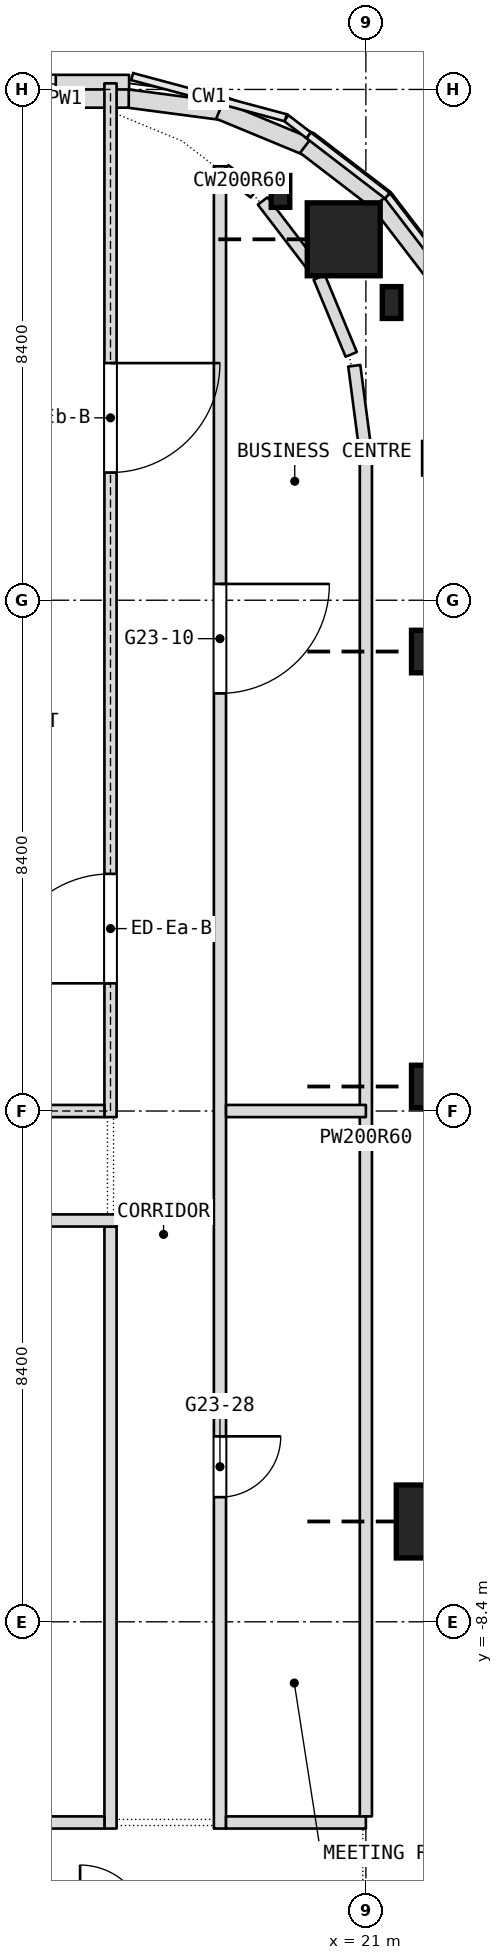
"""IFC4 building model, lengths in metres.
Left out: names, types, materials, properties, quantities, classifications, styles, units other than length and angle.
Written with IfcOpenShell. Run it as: python <this file> out.ifc"""

import sys

from ifc_helpers import new_model, si_unit, direction, frame, frame_2d, origin, origin_2d, place, context, subcontext, project, spatial, rectangle, i_section, extrude, element, fill, save


model = new_model("IFC4")
c1 = context("Model", 3, precision=1e-05, world=origin(), true_north=direction((0.0, 1.0)))
c2 = subcontext(c1, "Body", "Model", "MODEL_VIEW")
j1 = project(units=[si_unit("LENGTHUNIT", "METRE"), si_unit("PLANEANGLEUNIT", "RADIAN")], contexts=[c1])
p1 = place(None, origin())
s1 = spatial("IfcSite", under=j1, at=p1, CompositionType="ELEMENT")
p2 = place(p1, origin())
s2 = spatial("IfcBuilding", under=s1, at=p2, CompositionType="ELEMENT")
p3 = place(p2, frame((0.0, 0.0, 277.7)))
s3 = spatial("IfcBuildingStorey", under=s2, at=p3, CompositionType="ELEMENT", Elevation=277.7)
p4 = place(p3, frame((19.596, 15.123, -0.26), z_axis=(0.0, 0.0, 1.0), x_axis=(1.0, 0.0, 0.0)))
e1 = element("IfcColumn", 1, at=p4, inside=s3, PredefinedType="COLUMN", context=c2, shape_type="SweptSolid", body=[
    extrude(i_section(OverallWidth=0.306, OverallDepth=0.524, WebThickness=0.024, FlangeThickness=0.04, FilletRadius=0.027, at=origin_2d()), origin(), (0.0, 0.0, 1.0), 3.2),
])
p5 = place(p3, frame((20.635, 14.335, 0.0), z_axis=(0.0, 0.0, 1.0), x_axis=(1.0, 0.0, 0.0)))
e2 = element("IfcColumn", 2, at=p5, inside=s3, PredefinedType="COLUMN", context=c2, shape_type="SweptSolid", body=[
    extrude(i_section(OverallWidth=0.306, OverallDepth=0.524, WebThickness=0.024, FlangeThickness=0.04, FilletRadius=0.027, at=origin_2d()), origin(), (0.0, 0.0, 1.0), 2.94),
])
for number, where, z_axis, x_axis in (
    (3, (21.423, 13.296, -0.26), (0.0, 0.0, 1.0), (1.0, 0.0, 0.0)),
    (4, (22.1, 10.734, -0.26), (0.0, 0.0, 1.0), (1.0, 0.0, 0.0)),
):
    element("IfcColumn", number, at=place(p3, frame(where, z_axis=z_axis, x_axis=x_axis)), inside=s3, PredefinedType="COLUMN", context=c2, shape_type="SweptSolid", body=[
        extrude(i_section(OverallWidth=0.306, OverallDepth=0.524, WebThickness=0.024, FlangeThickness=0.04, FilletRadius=0.027, at=origin_2d()), origin(), (0.0, 0.0, 1.0), 3.2),
    ])
for number, where, z_axis, x_axis in (
    (5, (22.1, 7.556, 0.0), (0.0, 0.0, 1.0), (1.0, 0.0, 0.0)),
    (6, (22.1, 0.403, 0.0), (0.0, 0.0, 1.0), (1.0, 0.0, 0.0)),
    (7, (22.1, -6.75, 0.0), (0.0, 0.0, 1.0), (1.0, 0.0, 0.0)),
):
    element("IfcColumn", number, at=place(p3, frame(where, z_axis=z_axis, x_axis=x_axis)), inside=s3, PredefinedType="COLUMN", context=c2, shape_type="SweptSolid", body=[
        extrude(i_section(OverallWidth=0.306, OverallDepth=0.524, WebThickness=0.024, FlangeThickness=0.04, FilletRadius=0.027, at=origin_2d()), origin(), (0.0, 0.0, 1.0), 2.94),
    ])
p6 = place(p3, frame((21.0, -11.6, 0.0), z_axis=(0.0, 0.0, 1.0), x_axis=(0.0, 1.0, 0.0)))
e8 = element("IfcWall", 8, at=p6, inside=s3, PredefinedType="PARTITIONING", context=c2, shape_type="SweptSolid", body=[
    extrude(rectangle(XDim=22.302, YDim=0.2, at=frame_2d((11.151, 0.0))), origin(), (0.0, 0.0, 1.0), 3.34),
])
p7 = place(p3, frame((18.6, -11.8, 0.0), z_axis=(0.0, 0.0, 1.0), x_axis=(0.0, 1.0, 0.0)))
e9 = element("IfcWall", 9, at=p7, inside=s3, PredefinedType="PARTITIONING", context=c2, shape_type="SweptSolid", body=[
    extrude(rectangle(XDim=27.336, YDim=0.2, at=frame_2d((13.668, 0.0))), origin(), (0.0, 0.0, 1.0), 3.34),
])
p8 = place(p7, frame((18.668, 0.0, 0.0)))
e10 = element("IfcOpeningElement", 10, at=p8, cuts=e9, PredefinedType="OPENING", context=c2, shape_type="SweptSolid", body=[
    extrude(rectangle(XDim=1.8, YDim=2.1, at=frame_2d((0.9, 1.05))), frame((0.0, 0.1, 0.0), z_axis=(0.0, -1.0, 0.0), x_axis=(1.0, 0.0, 0.0)), (0.0, 0.0, 1.0), 0.2),
])
p9 = place(p7, frame((5.45, 0.0, 0.0)))
e11 = element("IfcOpeningElement", 11, at=p9, cuts=e9, PredefinedType="OPENING", context=c2, shape_type="SweptSolid", body=[
    extrude(rectangle(XDim=1.0, YDim=2.1, at=frame_2d((0.5, 1.05))), frame((0.0, 0.1, 0.0), z_axis=(0.0, -1.0, 0.0), x_axis=(1.0, 0.0, 0.0)), (0.0, 0.0, 1.0), 0.2),
])
p10 = place(p3, frame((16.8, -11.8, 0.0), z_axis=(0.0, 0.0, 1.0), x_axis=(0.0, 1.0, 0.0)))
e12 = element("IfcWall", 12, at=p10, inside=s3, PredefinedType="PARTITIONING", context=c2, shape_type="SweptSolid", body=[
    extrude(rectangle(XDim=9.9, YDim=0.2, at=frame_2d((4.95, 0.0))), origin(), (0.0, 0.0, 1.0), 3.34),
])
p11 = place(p3, frame((-8.3, -11.7, 0.0), z_axis=(0.0, 0.0, 1.0), x_axis=(1.0, 0.0, 0.0)))
e13 = element("IfcWall", 13, at=p11, inside=s3, PredefinedType="PARTITIONING", context=c2, shape_type="SweptSolid", body=[
    extrude(rectangle(XDim=25.0, YDim=0.2, at=frame_2d((12.5, 0.0))), origin(), (0.0, 0.0, 1.0), 3.34),
])
p12 = place(p3, frame((18.7, -11.7, 0.0), z_axis=(0.0, 0.0, 1.0), x_axis=(1.0, 0.0, 0.0)))
e14 = element("IfcWall", 14, at=p12, inside=s3, PredefinedType="PARTITIONING", context=c2, shape_type="SweptSolid", body=[
    extrude(rectangle(XDim=2.3, YDim=0.2, at=frame_2d((1.15, 0.0))), origin(), (0.0, 0.0, 1.0), 3.34),
])
p13 = place(p3, frame((-16.9, -1.8, 0.0), z_axis=(0.0, 0.0, 1.0), x_axis=(1.0, 0.0, 0.0)))
e15 = element("IfcWall", 15, at=p13, inside=s3, PredefinedType="PARTITIONING", context=c2, shape_type="SweptSolid", body=[
    extrude(rectangle(XDim=33.8, YDim=0.2, at=frame_2d((16.9, 0.0))), origin(), (0.0, 0.0, 1.0), 3.34),
])
p14 = place(p13, frame((1.7, 0.0, 0.0)))
e16 = element("IfcOpeningElement", 16, at=p14, cuts=e15, PredefinedType="OPENING", context=c2, shape_type="SweptSolid", body=[
    extrude(rectangle(XDim=1.0, YDim=2.1, at=frame_2d((0.5, 1.05))), frame((0.0, 0.1, 0.0), z_axis=(0.0, -1.0, 0.0), x_axis=(1.0, 0.0, 0.0)), (0.0, 0.0, 1.0), 0.2),
])
p15 = place(p13, frame((5.9, 0.0, 0.0)))
e17 = element("IfcOpeningElement", 17, at=p15, cuts=e15, PredefinedType="OPENING", context=c2, shape_type="SweptSolid", body=[
    extrude(rectangle(XDim=1.0, YDim=2.1, at=frame_2d((0.5, 1.05))), frame((0.0, 0.1, 0.0), z_axis=(0.0, -1.0, 0.0), x_axis=(1.0, 0.0, 0.0)), (0.0, 0.0, 1.0), 0.2),
])
p16 = place(p13, frame((10.1, 0.0, 0.0)))
e18 = element("IfcOpeningElement", 18, at=p16, cuts=e15, PredefinedType="OPENING", context=c2, shape_type="SweptSolid", body=[
    extrude(rectangle(XDim=1.0, YDim=2.1, at=frame_2d((0.5, 1.05))), frame((0.0, 0.1, 0.0), z_axis=(0.0, -1.0, 0.0), x_axis=(1.0, 0.0, 0.0)), (0.0, 0.0, 1.0), 0.2),
])
p17 = place(p13, frame((16.0, 0.0, 0.0)))
e19 = element("IfcOpeningElement", 19, at=p17, cuts=e15, PredefinedType="OPENING", context=c2, shape_type="SweptSolid", body=[
    extrude(rectangle(XDim=1.8, YDim=2.1, at=frame_2d((0.9, 1.05))), frame((0.0, 0.1, 0.0), z_axis=(0.0, -1.0, 0.0), x_axis=(1.0, 0.0, 0.0)), (0.0, 0.0, 1.0), 0.2),
])
p18 = place(p13, frame((22.7, 0.0, 0.0)))
e20 = element("IfcOpeningElement", 20, at=p18, cuts=e15, PredefinedType="OPENING", context=c2, shape_type="SweptSolid", body=[
    extrude(rectangle(XDim=1.0, YDim=2.1, at=frame_2d((0.5, 1.05))), frame((0.0, 0.1, 0.0), z_axis=(0.0, -1.0, 0.0), x_axis=(1.0, 0.0, 0.0)), (0.0, 0.0, 1.0), 0.2),
])
p19 = place(p13, frame((26.9, 0.0, 0.0)))
e21 = element("IfcOpeningElement", 21, at=p19, cuts=e15, PredefinedType="OPENING", context=c2, shape_type="SweptSolid", body=[
    extrude(rectangle(XDim=1.0, YDim=2.1, at=frame_2d((0.5, 1.05))), frame((0.0, 0.1, 0.0), z_axis=(0.0, -1.0, 0.0), x_axis=(1.0, 0.0, 0.0)), (0.0, 0.0, 1.0), 0.2),
])
p20 = place(p13, frame((31.1, 0.0, 0.0)))
e22 = element("IfcOpeningElement", 22, at=p20, cuts=e15, PredefinedType="OPENING", context=c2, shape_type="SweptSolid", body=[
    extrude(rectangle(XDim=1.0, YDim=2.1, at=frame_2d((0.5, 1.05))), frame((0.0, 0.1, 0.0), z_axis=(0.0, -1.0, 0.0), x_axis=(1.0, 0.0, 0.0)), (0.0, 0.0, 1.0), 0.2),
])
p21 = place(p3, frame((18.7, 0.0, 0.0), z_axis=(0.0, 0.0, 1.0), x_axis=(1.0, 0.0, 0.0)))
e23 = element("IfcWall", 23, at=p21, inside=s3, PredefinedType="PARTITIONING", context=c2, shape_type="SweptSolid", body=[
    extrude(rectangle(XDim=2.3, YDim=0.2, at=frame_2d((1.15, 0.0))), origin(), (0.0, 0.0, 1.0), 2.94),
])
p22 = place(p3, frame((20.809, 12.256, 0.0), z_axis=(0.0, 0.0, 1.0), x_axis=(0.129841713905, -0.991534734303, 0.0)))
e24 = element("IfcWall", 24, at=p22, inside=s3, PredefinedType="PARTITIONING", context=c2, shape_type="SweptSolid", body=[
    extrude(rectangle(XDim=1.371, YDim=0.2, at=frame_2d((0.686, 0.0))), origin(), (0.0, 0.0, 1.0), 3.34),
])
p23 = place(p3, frame((18.679, 15.475, 0.0), z_axis=(0.0, 0.0, 1.0), x_axis=(0.794663000987, -0.607050833837, 0.0)))
e25 = element("IfcWall", 25, at=p23, inside=s3, PredefinedType="PARTITIONING", context=c2, shape_type="SweptSolid", body=[
    extrude(rectangle(XDim=0.613, YDim=0.2, at=frame_2d((0.306, 0.0))), origin(), (0.0, 0.0, 1.0), 3.34),
])
p24 = place(p3, frame((20.233, 13.71, 0.0), z_axis=(0.0, 0.0, 1.0), x_axis=(0.383540942064, -0.923523873953, 0.0)))
e26 = element("IfcWall", 26, at=p24, inside=s3, PredefinedType="PARTITIONING", context=c2, shape_type="SweptSolid", body=[
    extrude(rectangle(XDim=1.372, YDim=0.2, at=frame_2d((0.686, 0.0))), origin(), (0.0, 0.0, 1.0), 3.34),
])
p25 = place(p3, frame((19.303, 14.966, 0.0), z_axis=(0.0, 0.0, 1.0), x_axis=(0.607522804237, -0.794302236137, 0.0)))
e27 = element("IfcWall", 27, at=p25, inside=s3, PredefinedType="PARTITIONING", context=c2, shape_type="SweptSolid", body=[
    extrude(rectangle(XDim=1.371, YDim=0.2, at=frame_2d((0.686, 0.0))), origin(), (0.0, 0.0, 1.0), 3.34),
])
p26 = place(p3, frame((17.106, 16.89, 0.0), z_axis=(0.0, 0.0, 1.0), x_axis=(-1.0, 0.0, 0.0)))
e28 = element("IfcWall", 28, at=p26, inside=s3, PredefinedType="NOTDEFINED", context=c2, shape_type="SweptSolid", body=[
    extrude(rectangle(XDim=4.506, YDim=0.3, at=frame_2d((2.253, 0.0))), origin(), (0.0, 0.0, 1.0), 3.6),
])
p27 = place(p26, frame((1.206, 0.0, 0.9)))
e29 = element("IfcOpeningElement", 29, at=p27, cuts=e28, PredefinedType="OPENING", context=c2, shape_type="SweptSolid", body=[
    extrude(rectangle(XDim=2.4, YDim=2.1, at=frame_2d((1.2, 1.05))), frame((0.0, 0.15, 0.0), z_axis=(0.0, -1.0, 0.0), x_axis=(1.0, 0.0, 0.0)), (0.0, 0.0, 1.0), 0.3),
])
p28 = place(p3, frame((17.08, 16.651, 3.6), z_axis=(0.0, 0.0, 1.0), x_axis=(0.991453765022, -0.130458544462, 0.0)))
e30 = element("IfcWall", 30, at=p28, inside=s3, PredefinedType="PARAPET", context=c2, shape_type="SweptSolid", body=[
    extrude(rectangle(XDim=1.566, YDim=0.3, at=frame_2d((0.783, 0.0))), origin(), (0.0, 0.0, 1.0), 1.1),
])
for number, where, z_axis, x_axis in (
    (31, (18.595, 16.457, 3.6), (0.0, 0.0, 1.0), (0.924, -0.383, 0.0)),
    (32, (20.009, 15.877, 3.6), (0.0, 0.0, 1.0), (0.793, -0.609, 0.0)),
):
    element("IfcWall", number, at=place(p3, frame(where, z_axis=z_axis, x_axis=x_axis)), inside=s3, PredefinedType="PARAPET", context=c2, shape_type="SweptSolid", body=[
        extrude(rectangle(XDim=1.566, YDim=0.3, at=frame_2d((0.783, 0.0))), origin(), (0.0, 0.0, 1.0), 1.1),
    ])
p29 = place(p3, frame((21.224, 14.951, 3.6), z_axis=(0.0, 0.0, 1.0), x_axis=(0.608791411033, -0.793330333374, 0.0)))
e33 = element("IfcWall", 33, at=p29, inside=s3, PredefinedType="PARAPET", context=c2, shape_type="SweptSolid", body=[
    extrude(rectangle(XDim=1.566, YDim=0.3, at=frame_2d((0.783, 0.0))), origin(), (0.0, 0.0, 1.0), 1.1),
])
p30 = place(p3, frame((15.0, 16.65, 3.6), z_axis=(0.0, 0.0, 1.0), x_axis=(1.0, 0.0, 0.0)))
e34 = element("IfcWall", 34, at=p30, inside=s3, PredefinedType="PARAPET", context=c2, shape_type="SweptSolid", body=[
    extrude(rectangle(XDim=2.1, YDim=0.3, at=frame_2d((1.05, 0.0))), origin(), (0.0, 0.0, 1.0), 1.1),
])
p31 = place(p3, frame((16.8, -0.1, 0.0), z_axis=(0.0, 0.0, 1.0), x_axis=(0.0, 1.0, 0.0)))
e35 = element("IfcWall", 35, at=p31, inside=s3, PredefinedType="PARTITIONING", context=c2, shape_type="SweptSolid", body=[
    extrude(rectangle(XDim=17.0, YDim=0.2, at=frame_2d((8.5, 0.0))), origin(), (0.0, 0.0, 1.0), 3.34),
])
p32 = place(p31, frame((2.2, 0.0, 0.0)))
e36 = element("IfcOpeningElement", 36, at=p32, cuts=e35, PredefinedType="OPENING", context=c2, shape_type="SweptSolid", body=[
    extrude(rectangle(XDim=1.8, YDim=2.1, at=frame_2d((0.9, 1.05))), frame((0.0, 0.1, 0.0), z_axis=(0.0, -1.0, 0.0), x_axis=(1.0, 0.0, 0.0)), (0.0, 0.0, 1.0), 0.2),
])
p33 = place(p31, frame((10.6, 0.0, 0.0)))
e37 = element("IfcOpeningElement", 37, at=p33, cuts=e35, PredefinedType="OPENING", context=c2, shape_type="SweptSolid", body=[
    extrude(rectangle(XDim=1.8, YDim=2.1, at=frame_2d((0.9, 1.05))), frame((0.0, 0.1, 0.0), z_axis=(0.0, -1.0, 0.0), x_axis=(1.0, 0.0, 0.0)), (0.0, 0.0, 1.0), 0.2),
])
p34 = place(p3, frame((11.7, 0.0, 0.0), z_axis=(0.0, 0.0, 1.0), x_axis=(1.0, 0.0, 0.0)))
e38 = element("IfcWall", 38, at=p34, inside=s3, PredefinedType="PARTITIONING", context=c2, shape_type="SweptSolid", body=[
    extrude(rectangle(XDim=5.0, YDim=0.2, at=frame_2d((2.5, 0.0))), origin(), (0.0, 0.0, 1.0), 3.0),
])
p35 = place(p8, origin())
e39 = element("IfcDoor", 39, at=p35, inside=s3, OperationType="DOUBLE_DOOR_SINGLE_SWING", PredefinedType="DOOR", context=c2, shape_type="SweptSolid", body=[
    extrude(rectangle(XDim=1.8, YDim=2.1, at=frame_2d((0.9, 1.05))), frame((0.0, 0.025, 0.0), z_axis=(0.0, -1.0, 0.0), x_axis=(1.0, 0.0, 0.0)), (0.0, 0.0, 1.0), 0.05),
])
fill(e10, e39)
p36 = place(p9, origin())
e40 = element("IfcDoor", 40, at=p36, inside=s3, OperationType="SINGLE_SWING_LEFT", PredefinedType="DOOR", context=c2, shape_type="SweptSolid", body=[
    extrude(rectangle(XDim=1.0, YDim=2.1, at=frame_2d((0.5, 1.05))), frame((0.0, 0.025, 0.0), z_axis=(0.0, -1.0, 0.0), x_axis=(1.0, 0.0, 0.0)), (0.0, 0.0, 1.0), 0.05),
])
fill(e11, e40)
p37 = place(p27, origin())
e41 = element("IfcWindow", 41, at=p37, inside=s3, PartitioningType="SINGLE_PANEL", PredefinedType="WINDOW", context=c2, shape_type="SweptSolid", body=[
    extrude(rectangle(XDim=2.4, YDim=2.1, at=frame_2d((1.2, 1.05))), frame((0.0, 0.03, 0.0), z_axis=(0.0, -1.0, 0.0), x_axis=(1.0, 0.0, 0.0)), (0.0, 0.0, 1.0), 0.06),
])
fill(e29, e41)
p38 = place(p32, origin())
e42 = element("IfcDoor", 42, at=p38, inside=s3, OperationType="DOUBLE_DOOR_SINGLE_SWING", PredefinedType="DOOR", context=c2, shape_type="SweptSolid", body=[
    extrude(rectangle(XDim=1.8, YDim=2.1, at=frame_2d((0.9, 1.05))), frame((0.0, 0.025, 0.0), z_axis=(0.0, -1.0, 0.0), x_axis=(1.0, 0.0, 0.0)), (0.0, 0.0, 1.0), 0.05),
])
fill(e36, e42)
p39 = place(p33, origin())
e43 = element("IfcDoor", 43, at=p39, inside=s3, OperationType="DOUBLE_DOOR_SINGLE_SWING", PredefinedType="DOOR", context=c2, shape_type="SweptSolid", body=[
    extrude(rectangle(XDim=1.8, YDim=2.1, at=frame_2d((0.9, 1.05))), frame((0.0, 0.025, 0.0), z_axis=(0.0, -1.0, 0.0), x_axis=(1.0, 0.0, 0.0)), (0.0, 0.0, 1.0), 0.05),
])
fill(e37, e43)
save(model, sys.argv[1])
